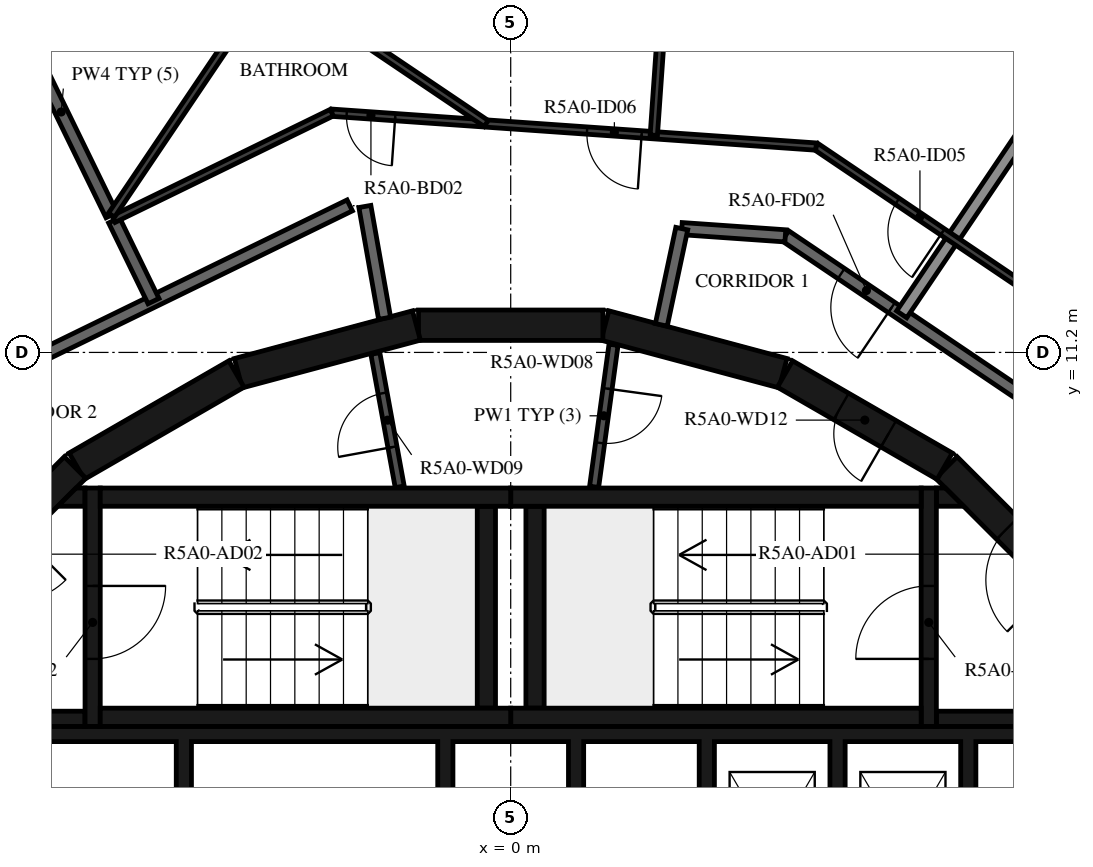
"""IFC4 building model, lengths in metres.
Left out: names, types, materials, properties, quantities, classifications, styles, units other than length and angle.
Written with IfcOpenShell. Run it as: python <this file> out.ifc"""

import sys

from ifc_helpers import new_model, si_unit, direction, frame, frame_2d, origin, place, context, subcontext, project, spatial, polyline, rectangle, outline, extrude, element, fill, save


model = new_model("IFC4")
c1 = context("Model", 3, precision=1e-05, world=origin(), true_north=direction((0.0, 1.0)))
c2 = subcontext(c1, "Body", "Model", "MODEL_VIEW")
j1 = project(units=[si_unit("LENGTHUNIT", "METRE"), si_unit("PLANEANGLEUNIT", "RADIAN")], contexts=[c1])
p1 = place(None, origin())
s1 = spatial("IfcSite", under=j1, at=p1, CompositionType="ELEMENT")
p2 = place(p1, origin())
s2 = spatial("IfcBuilding", under=s1, at=p2, CompositionType="ELEMENT")
p3 = place(p2, frame((0.0, 0.0, 195.4)))
s3 = spatial("IfcBuildingStorey", under=s2, at=p3, CompositionType="ELEMENT", Elevation=195.4)
p4 = place(p3, frame((9.308, 7.164, 0.0), z_axis=(0.0, 0.0, 1.0), x_axis=(-0.707106781187, 0.707106781187, 0.0)))
e1 = element("IfcWall", 1, at=p4, inside=s3, PredefinedType="SHEAR", context=c2, shape_type="SweptSolid", body=[
    extrude(rectangle(XDim=3.032, YDim=0.5, at=frame_2d((1.516, 0.0))), origin(), (0.0, 0.0, 1.0), 3.12),
])
p5 = place(p4, frame((0.416, 0.0, 0.0)))
e2 = element("IfcOpeningElement", 2, at=p5, cuts=e1, PredefinedType="OPENING", context=c2, shape_type="SweptSolid", body=[
    extrude(rectangle(XDim=1.2, YDim=2.1, at=frame_2d((0.6, 1.05))), frame((0.0, 0.26, 0.0), z_axis=(0.0, -1.0, 0.0), x_axis=(1.0, 0.0, 0.0)), (0.0, 0.0, 1.0), 0.52),
])
p6 = place(p3, frame((7.137, 9.329, 0.0), z_axis=(0.0, 0.0, 1.0), x_axis=(-0.865975092491, 0.500087131594, 0.0)))
e3 = element("IfcWall", 3, at=p6, inside=s3, PredefinedType="SHEAR", context=c2, shape_type="SweptSolid", body=[
    extrude(rectangle(XDim=3.033, YDim=0.5, at=frame_2d((1.516, 0.0))), origin(), (0.0, 0.0, 1.0), 3.12),
])
p7 = place(p6, frame((1.066, 0.0, 0.0)))
e4 = element("IfcOpeningElement", 4, at=p7, cuts=e3, PredefinedType="OPENING", context=c2, shape_type="SweptSolid", body=[
    extrude(rectangle(XDim=0.9, YDim=2.1, at=frame_2d((0.45, 1.05))), frame((0.0, 0.26, 0.0), z_axis=(0.0, -1.0, 0.0), x_axis=(1.0, 0.0, 0.0)), (0.0, 0.0, 1.0), 0.52),
])
for number, where, z_axis, x_axis in (
    (5, (4.479, 10.858, 0.0), (0.0, 0.0, 1.0), (-0.966, 0.259, 0.0)),
    (6, (1.516, 11.647, 0.0), (0.0, 0.0, 1.0), (-1.0, 0.0, 0.0)),
    (7, (-1.55, 11.643, 0.0), (0.0, 0.0, 1.0), (-0.966, -0.259, 0.0)),
    (8, (-4.51, 10.845, 0.0), (0.0, 0.0, 1.0), (-0.866, -0.5, 0.0)),
):
    element("IfcWall", number, at=place(p3, frame(where, z_axis=z_axis, x_axis=x_axis)), inside=s3, PredefinedType="SHEAR", context=c2, shape_type="SweptSolid", body=[
        extrude(rectangle(XDim=3.033, YDim=0.5, at=frame_2d((1.516, 0.0))), origin(), (0.0, 0.0, 1.0), 3.12),
    ])
p8 = place(p3, frame((-7.164, 9.308, 0.0), z_axis=(0.0, 0.0, 1.0), x_axis=(-0.707106781187, -0.707106781187, 0.0)))
e9 = element("IfcWall", 9, at=p8, inside=s3, PredefinedType="SHEAR", context=c2, shape_type="SweptSolid", body=[
    extrude(rectangle(XDim=3.032, YDim=0.5, at=frame_2d((1.516, 0.0))), origin(), (0.0, 0.0, 1.0), 3.12),
])
p9 = place(p8, frame((1.416, 0.0, 0.0)))
e10 = element("IfcOpeningElement", 10, at=p9, cuts=e9, PredefinedType="OPENING", context=c2, shape_type="SweptSolid", body=[
    extrude(rectangle(XDim=1.2, YDim=2.1, at=frame_2d((0.6, 1.05))), frame((0.0, 0.26, 0.0), z_axis=(0.0, -1.0, 0.0), x_axis=(1.0, 0.0, 0.0)), (0.0, 0.0, 1.0), 0.52),
])
for number, where, z_axis, x_axis in (
    (11, (0.0, 5.2, 0.0), (0.0, 0.0, 1.0), (1.0, 0.0, 0.0)),
    (12, (0.0, 8.82, 0.0), (0.0, 0.0, 1.0), (1.0, 0.0, 0.0)),
):
    element("IfcWall", number, at=place(p3, frame(where, z_axis=z_axis, x_axis=x_axis)), inside=s3, PredefinedType="SHEAR", context=c2, shape_type="SweptSolid", body=[
        extrude(rectangle(XDim=6.75, YDim=0.3, at=frame_2d((3.375, 0.0))), origin(), (0.0, 0.0, 1.0), 3.12),
    ])
p10 = place(p3, frame((0.4, 5.35, 0.0), z_axis=(0.0, 0.0, 1.0), x_axis=(0.0, 1.0, 0.0)))
e13 = element("IfcWall", 13, at=p10, inside=s3, PredefinedType="SHEAR", context=c2, shape_type="SweptSolid", body=[
    extrude(rectangle(XDim=3.32, YDim=0.3, at=frame_2d((1.66, 0.0))), origin(), (0.0, 0.0, 1.0), 3.12),
])
p11 = place(p3, frame((6.875, 5.05, 0.0), z_axis=(0.0, 0.0, 1.0), x_axis=(0.0, 1.0, 0.0)))
e14 = element("IfcWall", 14, at=p11, inside=s3, PredefinedType="SHEAR", context=c2, shape_type="SweptSolid", body=[
    extrude(rectangle(XDim=3.92, YDim=0.25, at=frame_2d((1.96, 0.0))), origin(), (0.0, 0.0, 1.0), 3.12),
])
p12 = place(p11, frame((1.11, 0.0, 0.0)))
e15 = element("IfcOpeningElement", 15, at=p12, cuts=e14, PredefinedType="OPENING", context=c2, shape_type="SweptSolid", body=[
    extrude(rectangle(XDim=1.2, YDim=2.1, at=frame_2d((0.6, 1.05))), frame((0.0, 0.135, 0.0), z_axis=(0.0, -1.0, 0.0), x_axis=(1.0, 0.0, 0.0)), (0.0, 0.0, 1.0), 0.27),
])
p13 = place(p3, frame((7.0, 5.175, 0.0), z_axis=(0.0, 0.0, 1.0), x_axis=(1.0, 0.0, 0.0)))
e16 = element("IfcWall", 16, at=p13, inside=s3, PredefinedType="SHEAR", context=c2, shape_type="SweptSolid", body=[
    extrude(rectangle(XDim=3.1, YDim=0.25, at=frame_2d((1.55, 0.0))), origin(), (0.0, 0.0, 1.0), 3.12),
])
p14 = place(p3, origin())
e17 = element("IfcWall", 17, at=p14, inside=s3, PredefinedType="SHEAR", context=c2, shape_type="SweptSolid", body=[
    extrude(outline(polyline([(7.448, 8.67), (7.0, 8.67), (7.0, 8.97), (7.148, 8.97), (7.448, 8.67)])), origin(), (0.0, 0.0, 1.0), 3.12),
])
for number, where, z_axis, x_axis in (
    (18, (-6.75, 5.2, 0.0), (0.0, 0.0, 1.0), (1.0, 0.0, 0.0)),
    (19, (-6.75, 8.82, 0.0), (0.0, 0.0, 1.0), (1.0, 0.0, 0.0)),
):
    element("IfcWall", number, at=place(p3, frame(where, z_axis=z_axis, x_axis=x_axis)), inside=s3, PredefinedType="SHEAR", context=c2, shape_type="SweptSolid", body=[
        extrude(rectangle(XDim=6.75, YDim=0.3, at=frame_2d((3.375, 0.0))), origin(), (0.0, 0.0, 1.0), 3.12),
    ])
p15 = place(p3, frame((-0.4, 5.35, 0.0), z_axis=(0.0, 0.0, 1.0), x_axis=(0.0, 1.0, 0.0)))
e20 = element("IfcWall", 20, at=p15, inside=s3, PredefinedType="SHEAR", context=c2, shape_type="SweptSolid", body=[
    extrude(rectangle(XDim=3.32, YDim=0.3, at=frame_2d((1.66, 0.0))), origin(), (0.0, 0.0, 1.0), 3.12),
])
p16 = place(p3, frame((-6.875, 8.97, 0.0), z_axis=(0.0, 0.0, 1.0), x_axis=(0.0, -1.0, 0.0)))
e21 = element("IfcWall", 21, at=p16, inside=s3, PredefinedType="SHEAR", context=c2, shape_type="SweptSolid", body=[
    extrude(rectangle(XDim=3.92, YDim=0.25, at=frame_2d((1.96, 0.0))), origin(), (0.0, 0.0, 1.0), 3.12),
])
p17 = place(p16, frame((1.61, 0.0, 0.0)))
e22 = element("IfcOpeningElement", 22, at=p17, cuts=e21, PredefinedType="OPENING", context=c2, shape_type="SweptSolid", body=[
    extrude(rectangle(XDim=1.2, YDim=2.1, at=frame_2d((0.6, 1.05))), frame((0.0, 0.135, 0.0), z_axis=(0.0, -1.0, 0.0), x_axis=(1.0, 0.0, 0.0)), (0.0, 0.0, 1.0), 0.27),
])
p18 = place(p3, frame((-7.0, 5.175, 0.0), z_axis=(0.0, 0.0, 1.0), x_axis=(-1.0, 0.0, 0.0)))
e23 = element("IfcWall", 23, at=p18, inside=s3, PredefinedType="SHEAR", context=c2, shape_type="SweptSolid", body=[
    extrude(rectangle(XDim=3.1, YDim=0.25, at=frame_2d((1.55, 0.0))), origin(), (0.0, 0.0, 1.0), 3.12),
])
p19 = place(p3, origin())
e24 = element("IfcWall", 24, at=p19, inside=s3, PredefinedType="SHEAR", context=c2, shape_type="SweptSolid", body=[
    extrude(outline(polyline([(-7.148, 8.97), (-7.0, 8.97), (-7.0, 8.67), (-7.448, 8.67), (-7.148, 8.97)])), origin(), (0.0, 0.0, 1.0), 3.12),
])
p20 = place(p3, origin())
e25 = element("IfcWall", 25, at=p20, inside=s3, PredefinedType="SHEAR", context=c2, shape_type="SweptSolid", body=[
    extrude(outline(polyline([(-9.55, 4.8), (-5.5, 4.8), (-5.5, 1.9), (-5.25, 1.9), (-5.25, 4.8), (-1.2, 4.8), (-1.2, 1.9), (-0.95, 1.9), (-0.95, 4.8), (0.95, 4.8), (0.95, 1.9), (1.2, 1.9), (1.2, 4.8), (3.1, 4.8), (3.1, 1.9), (3.35, 1.9), (3.35, 4.8), (5.25, 4.8), (5.25, 1.9), (5.5, 1.9), (5.5, 4.8), (7.4, 4.8), (7.4, 1.9), (7.65, 1.9), (7.65, 4.8), (9.55, 4.8), (9.55, 1.9), (9.8, 1.9), (9.8, 4.8), (9.8, 5.05), (-9.8, 5.05), (-9.8, 4.8), (-9.8, 1.9), (-9.55, 1.9), (-9.55, 4.8)])), origin(), (0.0, 0.0, 1.0), 3.12),
])
p21 = place(p3, frame((1.691, 11.326, 0.0), z_axis=(0.0, 0.0, 1.0), x_axis=(-0.135344253201, -0.990798633994, 0.0)))
e26 = element("IfcWall", 26, at=p21, inside=s3, PredefinedType="PARTITIONING", context=c2, shape_type="SweptSolid", body=[
    extrude(rectangle(XDim=2.358, YDim=0.15, at=frame_2d((1.179, 0.0))), origin(), (0.0, 0.0, 1.0), 3.12),
])
p22 = place(p21, frame((0.729, 0.0, 0.0)))
e27 = element("IfcOpeningElement", 27, at=p22, cuts=e26, PredefinedType="OPENING", context=c2, shape_type="SweptSolid", body=[
    extrude(rectangle(XDim=0.9, YDim=2.1, at=frame_2d((0.45, 1.05))), frame((0.0, 0.085, 0.0), z_axis=(0.0, -1.0, 0.0), x_axis=(1.0, 0.0, 0.0)), (0.0, 0.0, 1.0), 0.17),
])
p23 = place(p3, frame((-1.825, 8.99, 0.0), z_axis=(0.0, 0.0, 1.0), x_axis=(-0.179955206115, 0.983674805915, 0.0)))
e28 = element("IfcWall", 28, at=p23, inside=s3, PredefinedType="PARTITIONING", context=c2, shape_type="SweptSolid", body=[
    extrude(rectangle(XDim=2.229, YDim=0.15, at=frame_2d((1.115, 0.0))), origin(), (0.0, 0.0, 1.0), 3.12),
])
p24 = place(p23, frame((0.665, 0.0, 0.0)))
e29 = element("IfcOpeningElement", 29, at=p24, cuts=e28, PredefinedType="OPENING", context=c2, shape_type="SweptSolid", body=[
    extrude(rectangle(XDim=0.9, YDim=2.1, at=frame_2d((0.45, 1.05))), frame((0.0, 0.085, 0.0), z_axis=(0.0, -1.0, 0.0), x_axis=(1.0, 0.0, 0.0)), (0.0, 0.0, 1.0), 0.17),
])
p25 = place(p3, frame((10.47, 9.101, 0.0), z_axis=(0.0, 0.0, 1.0), x_axis=(-0.829035841718, 0.559195469534, 0.0)))
e30 = element("IfcWall", 30, at=p25, inside=s3, PredefinedType="STANDARD", context=c2, shape_type="SweptSolid", body=[
    extrude(rectangle(XDim=7.181, YDim=0.2, at=frame_2d((3.591, 0.0))), origin(), (0.0, 0.0, 1.0), 3.12),
])
p26 = place(p25, frame((0.2, 0.0, 0.0)))
e31 = element("IfcOpeningElement", 31, at=p26, cuts=e30, PredefinedType="OPENING", context=c2, shape_type="SweptSolid", body=[
    extrude(rectangle(XDim=1.0, YDim=2.1, at=frame_2d((0.5, 1.05))), frame((0.0, 0.11, 0.0), z_axis=(0.0, -1.0, 0.0), x_axis=(1.0, 0.0, 0.0)), (0.0, 0.0, 1.0), 0.22),
])
p27 = place(p25, frame((5.073, 0.0, 0.0)))
e32 = element("IfcOpeningElement", 32, at=p27, cuts=e30, PredefinedType="OPENING", context=c2, shape_type="SweptSolid", body=[
    extrude(rectangle(XDim=1.0, YDim=2.1, at=frame_2d((0.5, 1.05))), frame((0.0, 0.11, 0.0), z_axis=(0.0, -1.0, 0.0), x_axis=(1.0, 0.0, 0.0)), (0.0, 0.0, 1.0), 0.22),
])
p28 = place(p3, frame((4.517, 13.117, 0.0), z_axis=(0.0, 0.0, 1.0), x_axis=(-0.997562153664, 0.069783591025, 0.0)))
e33 = element("IfcWall", 33, at=p28, inside=s3, PredefinedType="STANDARD", context=c2, shape_type="SweptSolid", body=[
    extrude(rectangle(XDim=1.707, YDim=0.2, at=frame_2d((0.854, 0.0))), origin(), (0.0, 0.0, 1.0), 3.12),
])
p29 = place(p3, frame((2.813, 13.236, 0.0), z_axis=(0.0, 0.0, 1.0), x_axis=(-0.207911086063, -0.978147729278, 0.0)))
e34 = element("IfcWall", 34, at=p29, inside=s3, PredefinedType="STANDARD", context=c2, shape_type="SweptSolid", body=[
    extrude(rectangle(XDim=1.618, YDim=0.2, at=frame_2d((0.809, 0.0))), origin(), (0.0, 0.0, 1.0), 3.12),
])
p30 = place(p3, frame((-2.074, 11.761, 0.0), z_axis=(0.0, 0.0, 1.0), x_axis=(-0.173740587112, 0.984791454263, 0.0)))
e35 = element("IfcWall", 35, at=p30, inside=s3, PredefinedType="STANDARD", context=c2, shape_type="SweptSolid", body=[
    extrude(rectangle(XDim=1.867, YDim=0.2, at=frame_2d((0.934, 0.0))), origin(), (0.0, 0.0, 1.0), 3.12),
])
p31 = place(p3, frame((-2.647, 13.618, 0.0), z_axis=(0.0, 0.0, 1.0), x_axis=(-0.898796543751, -0.438366026218, 0.0)))
e36 = element("IfcWall", 36, at=p31, inside=s3, PredefinedType="STANDARD", context=c2, shape_type="SweptSolid", body=[
    extrude(rectangle(XDim=7.181, YDim=0.2, at=frame_2d((3.591, 0.0))), origin(), (0.0, 0.0, 1.0), 3.12),
])
p32 = place(p3, frame((9.104, 15.79, 0.0), z_axis=(0.0, 0.0, 1.0), x_axis=(-0.559193912135, -0.829036892201, 0.0)))
e37 = element("IfcWall", 37, at=p32, inside=s3, PredefinedType="STANDARD", context=c2, shape_type="SweptSolid", body=[
    extrude(rectangle(XDim=4.781, YDim=0.2, at=frame_2d((2.39, 0.0))), origin(), (0.0, 0.0, 1.0), 2.73),
])
p33 = place(p3, frame((-6.522, 13.373, 0.0), z_axis=(0.0, 0.0, 1.0), x_axis=(0.438277270821, -0.8988398266, 0.0)))
e38 = element("IfcWall", 38, at=p33, inside=s3, PredefinedType="STANDARD", context=c2, shape_type="SweptSolid", body=[
    extrude(rectangle(XDim=1.479, YDim=0.2, at=frame_2d((0.74, 0.0))), origin(), (0.0, 0.0, 1.0), 3.12),
])
p34 = place(p3, frame((-8.219, 16.851, 0.0), z_axis=(0.0, 0.0, 1.0), x_axis=(0.438291091101, -0.898833087654, 0.0)))
e39 = element("IfcWall", 39, at=p34, inside=s3, PredefinedType="STANDARD", context=c2, shape_type="SweptSolid", body=[
    extrude(rectangle(XDim=3.774, YDim=0.2, at=frame_2d((1.887, 0.0))), origin(), (0.0, 0.0, 1.0), 3.12),
])
p35 = place(p3, frame((11.642, 10.12, 0.0), z_axis=(0.0, 0.0, 1.0), x_axis=(-0.829032241779, 0.55920080659, 0.0)))
e40 = element("IfcWall", 40, at=p35, inside=s3, PredefinedType="PARTITIONING", context=c2, shape_type="SweptSolid", body=[
    extrude(rectangle(XDim=7.985, YDim=0.12, at=frame_2d((3.992, 0.0))), origin(), (0.0, 0.0, 1.0), 3.12),
])
p36 = place(p35, frame((0.2, 0.0, 0.0)))
e41 = element("IfcOpeningElement", 41, at=p36, cuts=e40, PredefinedType="OPENING", context=c2, shape_type="SweptSolid", body=[
    extrude(rectangle(XDim=0.9, YDim=2.1, at=frame_2d((0.45, 1.05))), frame((0.0, 0.07, 0.0), z_axis=(0.0, -1.0, 0.0), x_axis=(1.0, 0.0, 0.0)), (0.0, 0.0, 1.0), 0.14),
])
p37 = place(p35, frame((5.475, 0.0, 0.0)))
e42 = element("IfcOpeningElement", 42, at=p37, cuts=e40, PredefinedType="OPENING", context=c2, shape_type="SweptSolid", body=[
    extrude(rectangle(XDim=0.9, YDim=2.1, at=frame_2d((0.45, 1.05))), frame((0.0, 0.07, 0.0), z_axis=(0.0, -1.0, 0.0), x_axis=(1.0, 0.0, 0.0)), (0.0, 0.0, 1.0), 0.14),
])
p38 = place(p3, frame((5.022, 14.585, 0.0), z_axis=(0.0, 0.0, 1.0), x_axis=(-0.997565118395, 0.069741197017, 0.0)))
e43 = element("IfcWall", 43, at=p38, inside=s3, PredefinedType="PARTITIONING", context=c2, shape_type="SweptSolid", body=[
    extrude(rectangle(XDim=7.985, YDim=0.12, at=frame_2d((3.993, 0.0))), origin(), (0.0, 0.0, 1.0), 3.12),
])
p39 = place(p38, frame((2.875, 0.0, 0.0)))
e44 = element("IfcOpeningElement", 44, at=p39, cuts=e43, PredefinedType="OPENING", context=c2, shape_type="SweptSolid", body=[
    extrude(rectangle(XDim=0.9, YDim=2.1, at=frame_2d((0.45, 1.05))), frame((0.0, 0.07, 0.0), z_axis=(0.0, -1.0, 0.0), x_axis=(1.0, 0.0, 0.0)), (0.0, 0.0, 1.0), 0.14),
])
p40 = place(p38, frame((6.938, 0.0, 0.0)))
e45 = element("IfcOpeningElement", 45, at=p40, cuts=e43, PredefinedType="OPENING", context=c2, shape_type="SweptSolid", body=[
    extrude(rectangle(XDim=0.8, YDim=2.1, at=frame_2d((0.4, 1.05))), frame((0.0, 0.07, 0.0), z_axis=(0.0, -1.0, 0.0), x_axis=(1.0, 0.0, 0.0)), (0.0, 0.0, 1.0), 0.14),
])
p41 = place(p3, frame((-2.943, 15.142, 0.0), z_axis=(0.0, 0.0, 1.0), x_axis=(-0.89881075705, -0.438336883014, 0.0)))
e46 = element("IfcWall", 46, at=p41, inside=s3, PredefinedType="PARTITIONING", context=c2, shape_type="SweptSolid", body=[
    extrude(rectangle(XDim=3.992, YDim=0.12, at=frame_2d((1.996, 0.0))), origin(), (0.0, 0.0, 1.0), 3.12),
])
p42 = place(p3, frame((2.725, 20.092, 0.0), z_axis=(0.0, 0.0, 1.0), x_axis=(-0.069766716578, -0.997563333958, 0.0)))
e47 = element("IfcWall", 47, at=p42, inside=s3, PredefinedType="PARTITIONING", context=c2, shape_type="SweptSolid", body=[
    extrude(rectangle(XDim=5.333, YDim=0.12, at=frame_2d((2.667, 0.0))), origin(), (0.0, 0.0, 1.0), 3.12),
])
p43 = place(p3, frame((-7.476, 19.735, 0.0), z_axis=(0.0, 0.0, 1.0), x_axis=(0.829035412992, -0.559196105142, 0.0)))
e48 = element("IfcWall", 48, at=p43, inside=s3, PredefinedType="PARTITIONING", context=c2, shape_type="SweptSolid", body=[
    extrude(rectangle(XDim=8.531, YDim=0.12, at=frame_2d((4.266, 0.0))), origin(), (0.0, 0.0, 1.0), 3.12),
])
p44 = place(p43, frame((2.204, 0.0, 0.0)))
e49 = element("IfcOpeningElement", 49, at=p44, cuts=e48, PredefinedType="OPENING", context=c2, shape_type="SweptSolid", body=[
    extrude(rectangle(XDim=0.9, YDim=2.1, at=frame_2d((0.45, 1.05))), frame((0.0, 0.07, 0.0), z_axis=(0.0, -1.0, 0.0), x_axis=(1.0, 0.0, 0.0)), (0.0, 0.0, 1.0), 0.14),
])
p45 = place(p3, frame((-3.939, 17.35, 0.0), z_axis=(0.0, 0.0, 1.0), x_axis=(-0.559193216274, -0.829037361566, 0.0)))
e50 = element("IfcWall", 50, at=p45, inside=s3, PredefinedType="PARTITIONING", context=c2, shape_type="SweptSolid", body=[
    extrude(rectangle(XDim=4.694, YDim=0.12, at=frame_2d((2.347, 0.0))), origin(), (0.0, 0.0, 1.0), 3.12),
])
p46 = place(p12, origin())
e51 = element("IfcDoor", 51, at=p46, inside=s3, OperationType="SINGLE_SWING_LEFT", PredefinedType="DOOR", context=c2, shape_type="SweptSolid", body=[
    extrude(rectangle(XDim=1.2, YDim=2.1, at=frame_2d((0.6, 1.05))), frame((0.0, 0.025, 0.0), z_axis=(0.0, -1.0, 0.0), x_axis=(1.0, 0.0, 0.0)), (0.0, 0.0, 1.0), 0.05),
])
fill(e15, e51)
p47 = place(p5, origin())
e52 = element("IfcDoor", 52, at=p47, inside=s3, OperationType="SINGLE_SWING_RIGHT", PredefinedType="DOOR", context=c2, shape_type="SweptSolid", body=[
    extrude(rectangle(XDim=1.2, YDim=2.1, at=frame_2d((0.6, 1.05))), frame((0.0, 0.025, 0.0), z_axis=(0.0, -1.0, 0.0), x_axis=(1.0, 0.0, 0.0)), (0.0, 0.0, 1.0), 0.05),
])
fill(e2, e52)
p48 = place(p17, origin())
e53 = element("IfcDoor", 53, at=p48, inside=s3, OperationType="SINGLE_SWING_LEFT", PredefinedType="DOOR", context=c2, shape_type="SweptSolid", body=[
    extrude(rectangle(XDim=1.2, YDim=2.1, at=frame_2d((0.6, 1.05))), frame((0.0, 0.025, 0.0), z_axis=(0.0, -1.0, 0.0), x_axis=(1.0, 0.0, 0.0)), (0.0, 0.0, 1.0), 0.05),
])
fill(e22, e53)
p49 = place(p22, origin())
e54 = element("IfcDoor", 54, at=p49, inside=s3, OperationType="SINGLE_SWING_RIGHT", PredefinedType="DOOR", context=c2, shape_type="SweptSolid", body=[
    extrude(rectangle(XDim=0.9, YDim=2.1, at=frame_2d((0.45, 1.05))), frame((0.0, 0.025, 0.0), z_axis=(0.0, -1.0, 0.0), x_axis=(1.0, 0.0, 0.0)), (0.0, 0.0, 1.0), 0.05),
])
fill(e27, e54)
p50 = place(p24, origin())
e55 = element("IfcDoor", 55, at=p50, inside=s3, OperationType="SINGLE_SWING_LEFT", PredefinedType="DOOR", context=c2, shape_type="SweptSolid", body=[
    extrude(rectangle(XDim=0.9, YDim=2.1, at=frame_2d((0.45, 1.05))), frame((0.0, 0.025, 0.0), z_axis=(0.0, -1.0, 0.0), x_axis=(1.0, 0.0, 0.0)), (0.0, 0.0, 1.0), 0.05),
])
fill(e29, e55)
p51 = place(p7, origin())
e56 = element("IfcDoor", 56, at=p51, inside=s3, OperationType="SINGLE_SWING_RIGHT", PredefinedType="DOOR", context=c2, shape_type="SweptSolid", body=[
    extrude(rectangle(XDim=0.9, YDim=2.1, at=frame_2d((0.45, 1.05))), frame((0.0, 0.025, 0.0), z_axis=(0.0, -1.0, 0.0), x_axis=(1.0, 0.0, 0.0)), (0.0, 0.0, 1.0), 0.05),
])
fill(e4, e56)
p52 = place(p27, origin())
e57 = element("IfcDoor", 57, at=p52, inside=s3, OperationType="SINGLE_SWING_RIGHT", PredefinedType="DOOR", context=c2, shape_type="SweptSolid", body=[
    extrude(rectangle(XDim=1.0, YDim=2.1, at=frame_2d((0.5, 1.05))), frame((0.0, 0.025, 0.0), z_axis=(0.0, -1.0, 0.0), x_axis=(1.0, 0.0, 0.0)), (0.0, 0.0, 1.0), 0.05),
])
fill(e32, e57)
p53 = place(p37, origin())
e58 = element("IfcDoor", 58, at=p53, inside=s3, OperationType="SINGLE_SWING_RIGHT", PredefinedType="DOOR", context=c2, shape_type="SweptSolid", body=[
    extrude(rectangle(XDim=0.9, YDim=2.1, at=frame_2d((0.45, 1.05))), frame((0.0, 0.025, 0.0), z_axis=(0.0, -1.0, 0.0), x_axis=(1.0, 0.0, 0.0)), (0.0, 0.0, 1.0), 0.05),
])
fill(e42, e58)
p54 = place(p39, origin())
e59 = element("IfcDoor", 59, at=p54, inside=s3, OperationType="SINGLE_SWING_RIGHT", PredefinedType="DOOR", context=c2, shape_type="SweptSolid", body=[
    extrude(rectangle(XDim=0.9, YDim=2.1, at=frame_2d((0.45, 1.05))), frame((0.0, 0.025, 0.0), z_axis=(0.0, -1.0, 0.0), x_axis=(1.0, 0.0, 0.0)), (0.0, 0.0, 1.0), 0.05),
])
fill(e44, e59)
p55 = place(p40, origin())
e60 = element("IfcDoor", 60, at=p55, inside=s3, OperationType="SINGLE_SWING_RIGHT", PredefinedType="DOOR", context=c2, shape_type="SweptSolid", body=[
    extrude(rectangle(XDim=0.8, YDim=2.1, at=frame_2d((0.4, 1.05))), frame((0.0, 0.025, 0.0), z_axis=(0.0, -1.0, 0.0), x_axis=(1.0, 0.0, 0.0)), (0.0, 0.0, 1.0), 0.05),
])
fill(e45, e60)
save(model, sys.argv[1])
